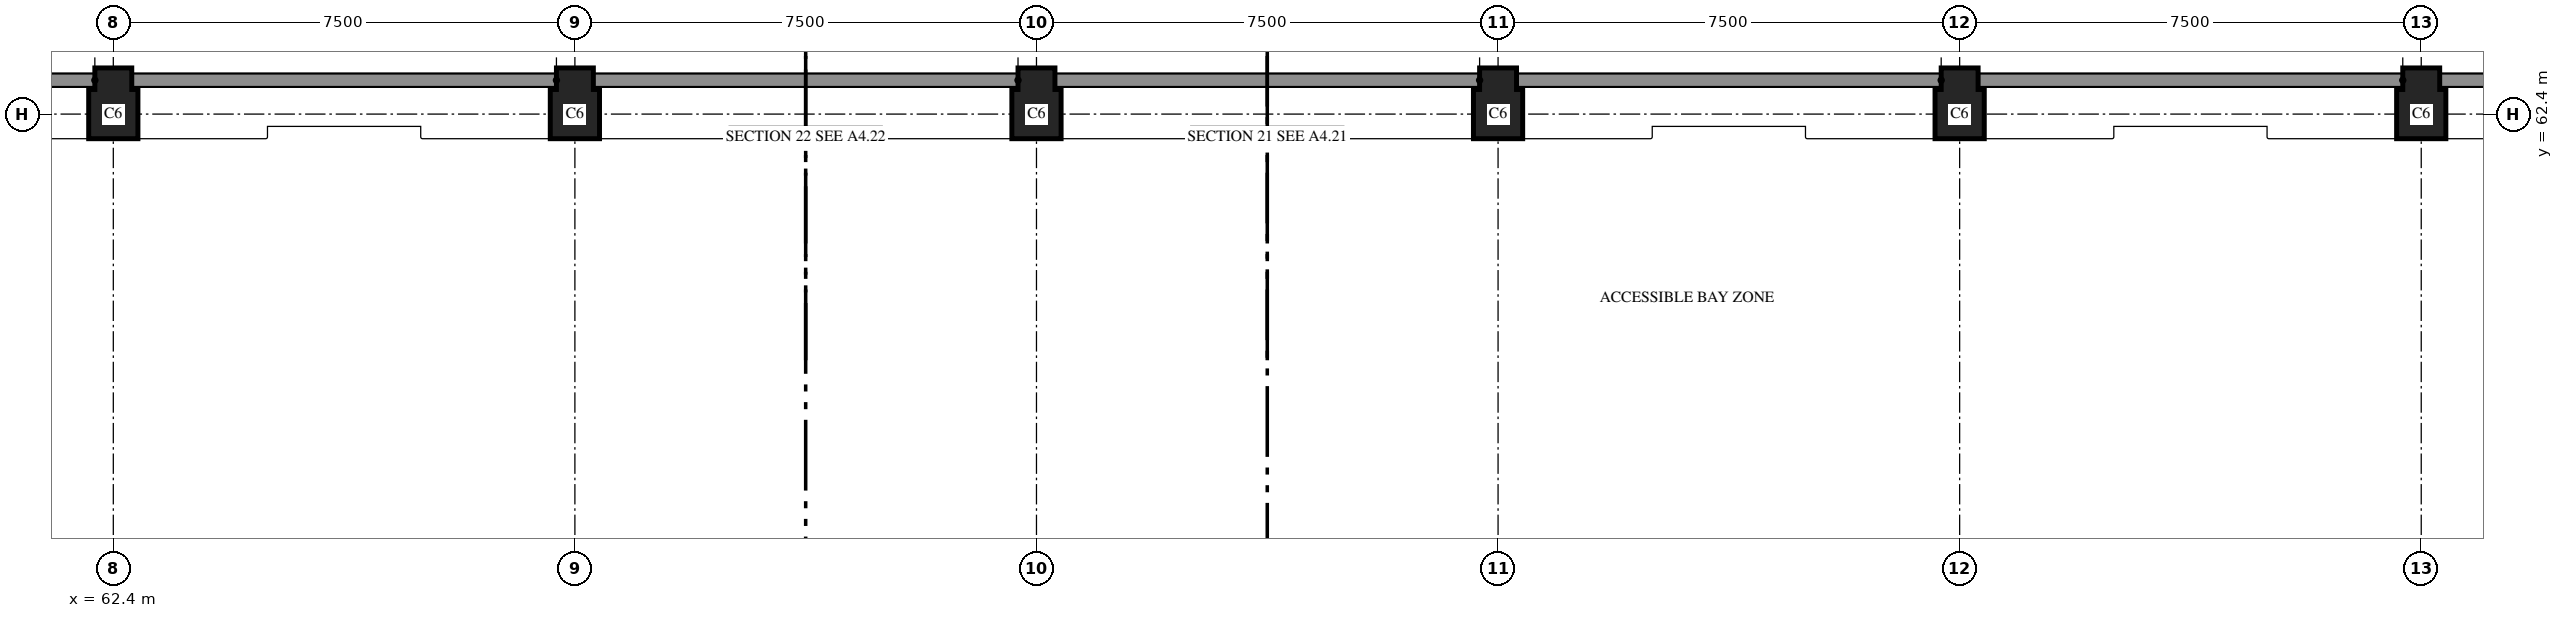
"""IFC4 building model, lengths in metres.
Left out: names, types, materials, properties, quantities, classifications, styles, units other than length and angle.
Written with IfcOpenShell. Run it as: python <this file> out.ifc"""

import sys

from ifc_helpers import new_model, si_unit, direction, frame, origin, place, context, subcontext, project, spatial, polyline, outline, extrude, element, save


model = new_model("IFC4")
c1 = context("Model", 3, precision=1e-05, world=origin(), true_north=direction((0.0, 1.0)))
c2 = subcontext(c1, "Body", "Model", "MODEL_VIEW")
j1 = project(units=[si_unit("LENGTHUNIT", "METRE"), si_unit("PLANEANGLEUNIT", "RADIAN")], contexts=[c1])
p1 = place(None, origin())
s1 = spatial("IfcSite", under=j1, at=p1, CompositionType="ELEMENT")
p2 = place(p1, origin())
s2 = spatial("IfcBuilding", under=s1, at=p2, CompositionType="ELEMENT")
p3 = place(p2, frame((0.0, 0.0, 15.6)))
s3 = spatial("IfcBuildingStorey", under=s2, at=p3, CompositionType="ELEMENT", Elevation=15.6)
for number, where, z_axis, x_axis in (
    (1, (62.4, 62.4, 0.0), (0.0, 0.0, 1.0), (0.0, 1.0, 0.0)),
    (2, (69.9, 62.4, 0.0), (0.0, 0.0, 1.0), (0.0, 1.0, 0.0)),
    (3, (77.4, 62.4, 0.0), (0.0, 0.0, 1.0), (0.0, 1.0, 0.0)),
    (4, (84.9, 62.4, 0.0), (0.0, 0.0, 1.0), (0.0, 1.0, 0.0)),
    (5, (92.4, 62.4, 0.0), (0.0, 0.0, 1.0), (0.0, 1.0, 0.0)),
    (6, (99.9, 62.4, 0.0), (0.0, 0.0, 1.0), (0.0, 1.0, 0.0)),
):
    element("IfcColumn", number, at=place(p3, frame(where, z_axis=z_axis, x_axis=x_axis)), inside=s3, PredefinedType="COLUMN", context=c2, shape_type="SweptSolid", body=[
        extrude(outline(polyline([(-0.4, -0.4), (0.4, -0.4), (0.4, -0.3), (0.75, -0.3), (0.75, 0.3), (0.4, 0.3), (0.4, 0.4), (-0.4, 0.4), (-0.4, -0.4)])), origin(), (0.0, 0.0, 1.0), 3.7),
    ])
save(model, sys.argv[1])
